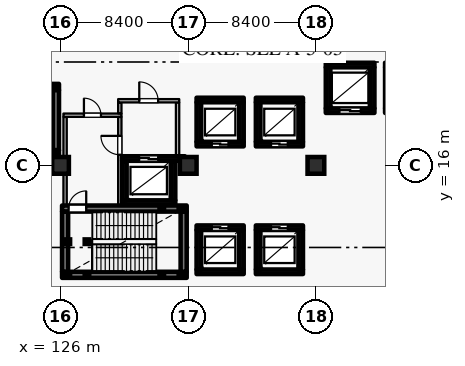
"""IFC4 building model, lengths in metres.
Left out: names, types, materials, properties, quantities, classifications, styles, units other than length and angle.
Written with IfcOpenShell. Run it as: python <this file> out.ifc"""

import sys

from ifc_helpers import new_model, si_unit, direction, frame, frame_2d, origin, origin_2d, place, context, subcontext, project, spatial, rectangle, hollow_rectangle, circle, extrude, element, fill, save


model = new_model("IFC4")
c1 = context("Model", 3, precision=1e-05, world=origin(), true_north=direction((0.0, 1.0)))
c2 = subcontext(c1, "Body", "Model", "MODEL_VIEW")
j1 = project(units=[si_unit("LENGTHUNIT", "METRE"), si_unit("PLANEANGLEUNIT", "RADIAN")], contexts=[c1])
p1 = place(None, origin())
s1 = spatial("IfcSite", under=j1, at=p1, CompositionType="ELEMENT")
p2 = place(p1, origin())
s2 = spatial("IfcBuilding", under=s1, at=p2, CompositionType="ELEMENT")
p3 = place(p2, frame((0.0, 0.0, 6.0)))
s3 = spatial("IfcBuildingStorey", under=s2, at=p3, CompositionType="ELEMENT", Elevation=6.0)
for number, where, z_axis, x_axis in (
    (1, (126.0, 16.0, 0.0), (0.0, 0.0, 1.0), (1.0, 0.0, 0.0)),
    (2, (134.4, 16.0, 0.0), (0.0, 0.0, 1.0), (1.0, 0.0, 0.0)),
    (3, (142.8, 16.0, 0.0), (0.0, 0.0, 1.0), (1.0, 0.0, 0.0)),
):
    element("IfcColumn", number, at=place(p3, frame(where, z_axis=z_axis, x_axis=x_axis)), inside=s3, PredefinedType="COLUMN", context=c2, shape_type="SweptSolid", body=[
        extrude(circle(Radius=0.55, at=origin_2d()), origin(), (0.0, 0.0, 1.0), 5.4),
    ])
p4 = place(p3, frame((134.95, 17.4, 0.0), z_axis=(0.0, 0.0, 1.0), x_axis=(1.0, 0.0, 0.0)))
e4 = element("IfcWall", 4, at=p4, inside=s3, PredefinedType="SHEAR", context=c2, shape_type="SweptSolid", body=[
    extrude(rectangle(XDim=3.1, YDim=0.3, at=frame_2d((1.55, 0.0))), origin(), (0.0, 0.0, 1.0), 5.045),
])
p5 = place(p4, frame((1.0, 0.0, 0.0)))
e5 = element("IfcOpeningElement", 5, at=p5, cuts=e4, PredefinedType="OPENING", context=c2, shape_type="SweptSolid", body=[
    extrude(rectangle(XDim=1.1, YDim=2.2, at=frame_2d((0.55, 1.1))), frame((0.0, 0.16, 0.0), z_axis=(0.0, -1.0, 0.0), x_axis=(1.0, 0.0, 0.0)), (0.0, 0.0, 1.0), 0.32),
])
p6 = place(p3, frame((137.9, 17.555, 0.0), z_axis=(0.0, 0.0, 1.0), x_axis=(0.0, 1.0, 0.0)))
e6 = element("IfcWall", 6, at=p6, inside=s3, PredefinedType="SHEAR", context=c2, shape_type="SweptSolid", body=[
    extrude(rectangle(XDim=2.59, YDim=0.3, at=frame_2d((1.295, 0.0))), origin(), (0.0, 0.0, 1.0), 5.045),
])
p7 = place(p3, frame((138.05, 20.3, 0.0), z_axis=(0.0, 0.0, 1.0), x_axis=(-1.0, 0.0, 0.0)))
e7 = element("IfcWall", 7, at=p7, inside=s3, PredefinedType="SHEAR", context=c2, shape_type="SweptSolid", body=[
    extrude(rectangle(XDim=3.1, YDim=0.3, at=frame_2d((1.55, 0.0))), origin(), (0.0, 0.0, 1.0), 5.045),
])
p8 = place(p3, frame((135.1, 20.145, 0.0), z_axis=(0.0, 0.0, 1.0), x_axis=(0.0, -1.0, 0.0)))
e8 = element("IfcWall", 8, at=p8, inside=s3, PredefinedType="SHEAR", context=c2, shape_type="SweptSolid", body=[
    extrude(rectangle(XDim=2.59, YDim=0.3, at=frame_2d((1.295, 0.0))), origin(), (0.0, 0.0, 1.0), 5.045),
])
p9 = place(p3, frame((138.85, 17.4, 0.0), z_axis=(0.0, 0.0, 1.0), x_axis=(1.0, 0.0, 0.0)))
e9 = element("IfcWall", 9, at=p9, inside=s3, PredefinedType="SHEAR", context=c2, shape_type="SweptSolid", body=[
    extrude(rectangle(XDim=3.1, YDim=0.3, at=frame_2d((1.55, 0.0))), origin(), (0.0, 0.0, 1.0), 5.045),
])
p10 = place(p9, frame((1.0, 0.0, 0.0)))
e10 = element("IfcOpeningElement", 10, at=p10, cuts=e9, PredefinedType="OPENING", context=c2, shape_type="SweptSolid", body=[
    extrude(rectangle(XDim=1.1, YDim=2.2, at=frame_2d((0.55, 1.1))), frame((0.0, 0.16, 0.0), z_axis=(0.0, -1.0, 0.0), x_axis=(1.0, 0.0, 0.0)), (0.0, 0.0, 1.0), 0.32),
])
p11 = place(p3, frame((141.8, 17.555, 0.0), z_axis=(0.0, 0.0, 1.0), x_axis=(0.0, 1.0, 0.0)))
e11 = element("IfcWall", 11, at=p11, inside=s3, PredefinedType="SHEAR", context=c2, shape_type="SweptSolid", body=[
    extrude(rectangle(XDim=2.59, YDim=0.3, at=frame_2d((1.295, 0.0))), origin(), (0.0, 0.0, 1.0), 5.045),
])
p12 = place(p3, frame((141.95, 20.3, 0.0), z_axis=(0.0, 0.0, 1.0), x_axis=(-1.0, 0.0, 0.0)))
e12 = element("IfcWall", 12, at=p12, inside=s3, PredefinedType="SHEAR", context=c2, shape_type="SweptSolid", body=[
    extrude(rectangle(XDim=3.1, YDim=0.3, at=frame_2d((1.55, 0.0))), origin(), (0.0, 0.0, 1.0), 5.045),
])
p13 = place(p3, frame((139.0, 20.145, 0.0), z_axis=(0.0, 0.0, 1.0), x_axis=(0.0, -1.0, 0.0)))
e13 = element("IfcWall", 13, at=p13, inside=s3, PredefinedType="SHEAR", context=c2, shape_type="SweptSolid", body=[
    extrude(rectangle(XDim=2.59, YDim=0.3, at=frame_2d((1.295, 0.0))), origin(), (0.0, 0.0, 1.0), 5.045),
])
p14 = place(p3, frame((134.95, 9.0, 0.0), z_axis=(0.0, 0.0, 1.0), x_axis=(1.0, 0.0, 0.0)))
e14 = element("IfcWall", 14, at=p14, inside=s3, PredefinedType="SHEAR", context=c2, shape_type="SweptSolid", body=[
    extrude(rectangle(XDim=3.1, YDim=0.3, at=frame_2d((1.55, 0.0))), origin(), (0.0, 0.0, 1.0), 5.045),
])
p15 = place(p3, frame((137.9, 9.155, 0.0), z_axis=(0.0, 0.0, 1.0), x_axis=(0.0, 1.0, 0.0)))
e15 = element("IfcWall", 15, at=p15, inside=s3, PredefinedType="SHEAR", context=c2, shape_type="SweptSolid", body=[
    extrude(rectangle(XDim=2.59, YDim=0.3, at=frame_2d((1.295, 0.0))), origin(), (0.0, 0.0, 1.0), 5.045),
])
p16 = place(p3, frame((138.05, 11.9, 0.0), z_axis=(0.0, 0.0, 1.0), x_axis=(-1.0, 0.0, 0.0)))
e16 = element("IfcWall", 16, at=p16, inside=s3, PredefinedType="SHEAR", context=c2, shape_type="SweptSolid", body=[
    extrude(rectangle(XDim=3.1, YDim=0.3, at=frame_2d((1.55, 0.0))), origin(), (0.0, 0.0, 1.0), 5.045),
])
p17 = place(p16, frame((1.0, 0.0, 0.0)))
e17 = element("IfcOpeningElement", 17, at=p17, cuts=e16, PredefinedType="OPENING", context=c2, shape_type="SweptSolid", body=[
    extrude(rectangle(XDim=1.1, YDim=2.2, at=frame_2d((0.55, 1.1))), frame((0.0, 0.16, 0.0), z_axis=(0.0, -1.0, 0.0), x_axis=(1.0, 0.0, 0.0)), (0.0, 0.0, 1.0), 0.32),
])
p18 = place(p3, frame((135.1, 11.745, 0.0), z_axis=(0.0, 0.0, 1.0), x_axis=(0.0, -1.0, 0.0)))
e18 = element("IfcWall", 18, at=p18, inside=s3, PredefinedType="SHEAR", context=c2, shape_type="SweptSolid", body=[
    extrude(rectangle(XDim=2.59, YDim=0.3, at=frame_2d((1.295, 0.0))), origin(), (0.0, 0.0, 1.0), 5.045),
])
p19 = place(p3, frame((138.85, 9.0, 0.0), z_axis=(0.0, 0.0, 1.0), x_axis=(1.0, 0.0, 0.0)))
e19 = element("IfcWall", 19, at=p19, inside=s3, PredefinedType="SHEAR", context=c2, shape_type="SweptSolid", body=[
    extrude(rectangle(XDim=3.1, YDim=0.3, at=frame_2d((1.55, 0.0))), origin(), (0.0, 0.0, 1.0), 5.045),
])
p20 = place(p3, frame((141.8, 9.155, 0.0), z_axis=(0.0, 0.0, 1.0), x_axis=(0.0, 1.0, 0.0)))
e20 = element("IfcWall", 20, at=p20, inside=s3, PredefinedType="SHEAR", context=c2, shape_type="SweptSolid", body=[
    extrude(rectangle(XDim=2.59, YDim=0.3, at=frame_2d((1.295, 0.0))), origin(), (0.0, 0.0, 1.0), 5.045),
])
p21 = place(p3, frame((141.95, 11.9, 0.0), z_axis=(0.0, 0.0, 1.0), x_axis=(-1.0, 0.0, 0.0)))
e21 = element("IfcWall", 21, at=p21, inside=s3, PredefinedType="SHEAR", context=c2, shape_type="SweptSolid", body=[
    extrude(rectangle(XDim=3.1, YDim=0.3, at=frame_2d((1.55, 0.0))), origin(), (0.0, 0.0, 1.0), 5.045),
])
p22 = place(p21, frame((1.0, 0.0, 0.0)))
e22 = element("IfcOpeningElement", 22, at=p22, cuts=e21, PredefinedType="OPENING", context=c2, shape_type="SweptSolid", body=[
    extrude(rectangle(XDim=1.1, YDim=2.2, at=frame_2d((0.55, 1.1))), frame((0.0, 0.16, 0.0), z_axis=(0.0, -1.0, 0.0), x_axis=(1.0, 0.0, 0.0)), (0.0, 0.0, 1.0), 0.32),
])
p23 = place(p3, frame((139.0, 11.745, 0.0), z_axis=(0.0, 0.0, 1.0), x_axis=(0.0, -1.0, 0.0)))
e23 = element("IfcWall", 23, at=p23, inside=s3, PredefinedType="SHEAR", context=c2, shape_type="SweptSolid", body=[
    extrude(rectangle(XDim=2.59, YDim=0.3, at=frame_2d((1.295, 0.0))), origin(), (0.0, 0.0, 1.0), 5.045),
])
p24 = place(p3, frame((130.05, 13.55, 0.0), z_axis=(0.0, 0.0, 1.0), x_axis=(1.0, 0.0, 0.0)))
e24 = element("IfcWall", 24, at=p24, inside=s3, PredefinedType="SHEAR", context=c2, shape_type="SweptSolid", body=[
    extrude(rectangle(XDim=3.5, YDim=0.3, at=frame_2d((1.75, 0.0))), origin(), (0.0, 0.0, 1.0), 5.045),
])
p25 = place(p3, frame((133.4, 13.705, 0.0), z_axis=(0.0, 0.0, 1.0), x_axis=(0.0, 1.0, 0.0)))
e25 = element("IfcWall", 25, at=p25, inside=s3, PredefinedType="SHEAR", context=c2, shape_type="SweptSolid", body=[
    extrude(rectangle(XDim=2.59, YDim=0.3, at=frame_2d((1.295, 0.0))), origin(), (0.0, 0.0, 1.0), 5.045),
])
p26 = place(p3, frame((134.18, 16.45, 0.0), z_axis=(0.0, 0.0, 1.0), x_axis=(-1.0, 0.0, 0.0)))
e26 = element("IfcWall", 26, at=p26, inside=s3, PredefinedType="SHEAR", context=c2, shape_type="SweptSolid", body=[
    extrude(rectangle(XDim=4.13, YDim=0.3, at=frame_2d((2.065, 0.0))), origin(), (0.0, 0.0, 1.0), 5.045),
])
p27 = place(p26, frame((1.755, 0.0, 0.0)))
e27 = element("IfcOpeningElement", 27, at=p27, cuts=e26, PredefinedType="OPENING", context=c2, shape_type="SweptSolid", body=[
    extrude(rectangle(XDim=1.25, YDim=2.25, at=frame_2d((0.625, 1.125))), frame((0.0, 0.16, 0.0), z_axis=(0.0, -1.0, 0.0), x_axis=(1.0, 0.0, 0.0)), (0.0, 0.0, 1.0), 0.32),
])
p28 = place(p3, frame((130.2, 16.295, 0.0), z_axis=(0.0, 0.0, 1.0), x_axis=(0.0, -1.0, 0.0)))
e28 = element("IfcWall", 28, at=p28, inside=s3, PredefinedType="SHEAR", context=c2, shape_type="SweptSolid", body=[
    extrude(rectangle(XDim=2.59, YDim=0.3, at=frame_2d((1.295, 0.0))), origin(), (0.0, 0.0, 1.0), 5.045),
])
p29 = place(p3, frame((143.45, 19.6, 0.0), z_axis=(0.0, 0.0, 1.0), x_axis=(1.0, 0.0, 0.0)))
e29 = element("IfcWall", 29, at=p29, inside=s3, PredefinedType="SHEAR", context=c2, shape_type="SweptSolid", body=[
    extrude(rectangle(XDim=3.2, YDim=0.3, at=frame_2d((1.6, 0.0))), origin(), (0.0, 0.0, 1.0), 5.045),
])
p30 = place(p29, frame((0.9, 0.0, 0.0)))
e30 = element("IfcOpeningElement", 30, at=p30, cuts=e29, PredefinedType="OPENING", context=c2, shape_type="SweptSolid", body=[
    extrude(rectangle(XDim=1.4, YDim=2.35, at=frame_2d((0.7, 1.175))), frame((0.0, 0.16, 0.0), z_axis=(0.0, -1.0, 0.0), x_axis=(1.0, 0.0, 0.0)), (0.0, 0.0, 1.0), 0.32),
])
p31 = place(p3, frame((146.5, 19.755, 0.0), z_axis=(0.0, 0.0, 1.0), x_axis=(0.0, 1.0, 0.0)))
e31 = element("IfcWall", 31, at=p31, inside=s3, PredefinedType="SHEAR", context=c2, shape_type="SweptSolid", body=[
    extrude(rectangle(XDim=2.69, YDim=0.3, at=frame_2d((1.345, 0.0))), origin(), (0.0, 0.0, 1.0), 5.045),
])
p32 = place(p3, frame((146.65, 22.6, 0.0), z_axis=(0.0, 0.0, 1.0), x_axis=(-1.0, 0.0, 0.0)))
e32 = element("IfcWall", 32, at=p32, inside=s3, PredefinedType="SHEAR", context=c2, shape_type="SweptSolid", body=[
    extrude(rectangle(XDim=3.2, YDim=0.3, at=frame_2d((1.6, 0.0))), origin(), (0.0, 0.0, 1.0), 5.045),
])
p33 = place(p3, frame((143.6, 22.445, 0.0), z_axis=(0.0, 0.0, 1.0), x_axis=(0.0, -1.0, 0.0)))
e33 = element("IfcWall", 33, at=p33, inside=s3, PredefinedType="SHEAR", context=c2, shape_type="SweptSolid", body=[
    extrude(rectangle(XDim=2.69, YDim=0.3, at=frame_2d((1.345, 0.0))), origin(), (0.0, 0.0, 1.0), 5.045),
])
p34 = place(p3, frame((126.1, 8.8, 0.0), z_axis=(0.0, 0.0, 1.0), x_axis=(1.0, 0.0, 0.0)))
e34 = element("IfcWall", 34, at=p34, inside=s3, PredefinedType="SHEAR", context=c2, shape_type="SweptSolid", body=[
    extrude(rectangle(XDim=8.2, YDim=0.4, at=frame_2d((4.1, 0.0))), origin(), (0.0, 0.0, 1.0), 5.045),
])
p35 = place(p3, frame((134.1, 9.005, 0.0), z_axis=(0.0, 0.0, 1.0), x_axis=(0.0, 1.0, 0.0)))
e35 = element("IfcWall", 35, at=p35, inside=s3, PredefinedType="SHEAR", context=c2, shape_type="SweptSolid", body=[
    extrude(rectangle(XDim=3.95, YDim=0.4, at=frame_2d((1.975, 0.0))), origin(), (0.0, 0.0, 1.0), 5.045),
])
p36 = place(p3, frame((126.1, 13.16, 0.0), z_axis=(0.0, 0.0, 1.0), x_axis=(1.0, 0.0, 0.0)))
e36 = element("IfcWall", 36, at=p36, inside=s3, PredefinedType="SHEAR", context=c2, shape_type="SweptSolid", body=[
    extrude(rectangle(XDim=8.2, YDim=0.4, at=frame_2d((4.1, 0.0))), origin(), (0.0, 0.0, 1.0), 5.045),
])
p37 = place(p36, frame((0.43, 0.0, 0.0)))
e37 = element("IfcOpeningElement", 37, at=p37, cuts=e36, PredefinedType="OPENING", context=c2, shape_type="SweptSolid", body=[
    extrude(rectangle(XDim=1.16, YDim=2.2, at=frame_2d((0.58, 1.1))), frame((0.0, 0.21, 0.0), z_axis=(0.0, -1.0, 0.0), x_axis=(1.0, 0.0, 0.0)), (0.0, 0.0, 1.0), 0.42),
])
p38 = place(p3, frame((126.3, 9.005, 0.0), z_axis=(0.0, 0.0, 1.0), x_axis=(0.0, 1.0, 0.0)))
e38 = element("IfcWall", 38, at=p38, inside=s3, PredefinedType="SHEAR", context=c2, shape_type="SweptSolid", body=[
    extrude(rectangle(XDim=3.95, YDim=0.4, at=frame_2d((1.975, 0.0))), origin(), (0.0, 0.0, 1.0), 5.045),
])
p39 = place(p3, frame((126.3, 13.365, 0.0), z_axis=(0.0, 0.0, 1.0), x_axis=(0.0, 1.0, 0.0)))
e39 = element("IfcWall", 39, at=p39, inside=s3, PredefinedType="PARTITIONING", context=c2, shape_type="SweptSolid", body=[
    extrude(rectangle(XDim=5.82, YDim=0.22, at=frame_2d((2.91, 0.0))), origin(), (0.0, 0.0, 1.0), 3.45),
])
p40 = place(p3, frame((126.19, 19.3, 0.0), z_axis=(0.0, 0.0, 1.0), x_axis=(1.0, 0.0, 0.0)))
e40 = element("IfcWall", 40, at=p40, inside=s3, PredefinedType="PARTITIONING", context=c2, shape_type="SweptSolid", body=[
    extrude(rectangle(XDim=3.82, YDim=0.22, at=frame_2d((1.91, 0.0))), origin(), (0.0, 0.0, 1.0), 5.045),
])
p41 = place(p40, frame((1.35, 0.0, 0.0)))
e41 = element("IfcOpeningElement", 41, at=p41, cuts=e40, PredefinedType="OPENING", context=c2, shape_type="SweptSolid", body=[
    extrude(rectangle(XDim=1.12, YDim=2.2, at=frame_2d((0.56, 1.1))), frame((0.0, 0.12, 0.0), z_axis=(0.0, -1.0, 0.0), x_axis=(1.0, 0.0, 0.0)), (0.0, 0.0, 1.0), 0.24),
])
p42 = place(p3, frame((129.9, 13.365, 0.0), z_axis=(0.0, 0.0, 1.0), x_axis=(0.0, 1.0, 0.0)))
e42 = element("IfcWall", 42, at=p42, inside=s3, PredefinedType="PARTITIONING", context=c2, shape_type="SweptSolid", body=[
    extrude(rectangle(XDim=5.82, YDim=0.22, at=frame_2d((2.91, 0.0))), origin(), (0.0, 0.0, 1.0), 5.045),
])
p43 = place(p42, frame((3.335, 0.0, 0.0)))
e43 = element("IfcOpeningElement", 43, at=p43, cuts=e42, PredefinedType="OPENING", context=c2, shape_type="SweptSolid", body=[
    extrude(rectangle(XDim=1.24, YDim=2.2, at=frame_2d((0.62, 1.1))), frame((0.0, 0.12, 0.0), z_axis=(0.0, -1.0, 0.0), x_axis=(1.0, 0.0, 0.0)), (0.0, 0.0, 1.0), 0.24),
])
p44 = place(p3, frame((129.9, 19.415, 0.0), z_axis=(0.0, 0.0, 1.0), x_axis=(0.0, 1.0, 0.0)))
e44 = element("IfcWall", 44, at=p44, inside=s3, PredefinedType="PARTITIONING", context=c2, shape_type="SweptSolid", body=[
    extrude(rectangle(XDim=0.72, YDim=0.22, at=frame_2d((0.36, 0.0))), origin(), (0.0, 0.0, 1.0), 5.045),
])
p45 = place(p3, frame((133.7, 16.605, 0.0), z_axis=(0.0, 0.0, 1.0), x_axis=(0.0, 1.0, 0.0)))
e45 = element("IfcWall", 45, at=p45, inside=s3, PredefinedType="PARTITIONING", context=c2, shape_type="SweptSolid", body=[
    extrude(rectangle(XDim=3.53, YDim=0.22, at=frame_2d((1.765, 0.0))), origin(), (0.0, 0.0, 1.0), 5.045),
])
p46 = place(p3, frame((129.79, 20.25, 0.0), z_axis=(0.0, 0.0, 1.0), x_axis=(1.0, 0.0, 0.0)))
e46 = element("IfcWall", 46, at=p46, inside=s3, PredefinedType="PARTITIONING", context=c2, shape_type="SweptSolid", body=[
    extrude(rectangle(XDim=4.02, YDim=0.22, at=frame_2d((2.01, 0.0))), origin(), (0.0, 0.0, 1.0), 5.045),
])
p47 = place(p46, frame((1.39, 0.0, 0.0)))
e47 = element("IfcOpeningElement", 47, at=p47, cuts=e46, PredefinedType="OPENING", context=c2, shape_type="SweptSolid", body=[
    extrude(rectangle(XDim=1.24, YDim=2.2, at=frame_2d((0.62, 1.1))), frame((0.0, 0.12, 0.0), z_axis=(0.0, -1.0, 0.0), x_axis=(1.0, 0.0, 0.0)), (0.0, 0.0, 1.0), 0.24),
])
for number, where, z_axis, x_axis in (
    (48, (126.48, 8.8, 0.0), (0.0, 0.0, 1.0), (1.0, 0.0, 0.0)),
    (49, (126.48, 10.98, 0.0), (0.0, 0.0, 1.0), (1.0, 0.0, 0.0)),
    (50, (127.74, 8.8, 0.0), (0.0, 0.0, 1.0), (1.0, 0.0, 0.0)),
    (51, (127.74, 10.98, 0.0), (0.0, 0.0, 1.0), (1.0, 0.0, 0.0)),
):
    element("IfcColumn", number, at=place(p3, frame(where, z_axis=z_axis, x_axis=x_axis)), inside=s3, PredefinedType="COLUMN", context=c2, shape_type="SweptSolid", body=[
        extrude(hollow_rectangle(XDim=0.3, YDim=0.3, WallThickness=0.012, at=origin_2d()), origin(), (0.0, 0.0, 1.0), 5.22),
    ])
for number, where, z_axis, x_axis in (
    (52, (132.66, 8.8, -3.0), (0.0, 0.0, 1.0), (1.0, 0.0, 0.0)),
    (53, (132.66, 13.16, -3.0), (0.0, 0.0, 1.0), (1.0, 0.0, 0.0)),
    (54, (133.92, 8.8, -3.0), (0.0, 0.0, 1.0), (1.0, 0.0, 0.0)),
    (55, (133.92, 13.16, -3.0), (0.0, 0.0, 1.0), (1.0, 0.0, 0.0)),
):
    element("IfcColumn", number, at=place(p3, frame(where, z_axis=z_axis, x_axis=x_axis)), inside=s3, PredefinedType="COLUMN", context=c2, shape_type="SweptSolid", body=[
        extrude(hollow_rectangle(XDim=0.3, YDim=0.3, WallThickness=0.012, at=origin_2d()), origin(), (0.0, 0.0, 1.0), 5.52),
    ])
p48 = place(p3, frame((117.7, 16.8, 0.0), z_axis=(0.0, 0.0, 1.0), x_axis=(1.0, 0.0, 0.0)))
e56 = element("IfcWall", 56, at=p48, inside=s3, PredefinedType="SHEAR", context=c2, shape_type="SweptSolid", body=[
    extrude(rectangle(XDim=8.2, YDim=0.4, at=frame_2d((4.1, 0.0))), origin(), (0.0, 0.0, 1.0), 5.045),
])
p49 = place(p3, frame((125.7, 17.005, 0.0), z_axis=(0.0, 0.0, 1.0), x_axis=(0.0, 1.0, 0.0)))
e57 = element("IfcWall", 57, at=p49, inside=s3, PredefinedType="SHEAR", context=c2, shape_type="SweptSolid", body=[
    extrude(rectangle(XDim=3.95, YDim=0.4, at=frame_2d((1.975, 0.0))), origin(), (0.0, 0.0, 1.0), 5.045),
])
p50 = place(p3, frame((117.7, 21.16, 0.0), z_axis=(0.0, 0.0, 1.0), x_axis=(1.0, 0.0, 0.0)))
e58 = element("IfcWall", 58, at=p50, inside=s3, PredefinedType="SHEAR", context=c2, shape_type="SweptSolid", body=[
    extrude(rectangle(XDim=8.2, YDim=0.4, at=frame_2d((4.1, 0.0))), origin(), (0.0, 0.0, 1.0), 5.045),
])
p51 = place(p50, frame((0.43, 0.0, 0.0)))
e59 = element("IfcOpeningElement", 59, at=p51, cuts=e58, PredefinedType="OPENING", context=c2, shape_type="SweptSolid", body=[
    extrude(rectangle(XDim=1.16, YDim=2.2, at=frame_2d((0.58, 1.1))), frame((0.0, 0.21, 0.0), z_axis=(0.0, -1.0, 0.0), x_axis=(1.0, 0.0, 0.0)), (0.0, 0.0, 1.0), 0.42),
])
for number, where, z_axis, x_axis in (
    (60, (125.52, 16.8, -3.0), (0.0, 0.0, 1.0), (1.0, 0.0, 0.0)),
    (61, (125.52, 21.16, -3.0), (0.0, 0.0, 1.0), (1.0, 0.0, 0.0)),
):
    element("IfcColumn", number, at=place(p3, frame(where, z_axis=z_axis, x_axis=x_axis)), inside=s3, PredefinedType="COLUMN", context=c2, shape_type="SweptSolid", body=[
        extrude(hollow_rectangle(XDim=0.3, YDim=0.3, WallThickness=0.012, at=origin_2d()), origin(), (0.0, 0.0, 1.0), 5.52),
    ])
p52 = place(p5, origin())
e62 = element("IfcDoor", 62, at=p52, inside=s3, OperationType="DOUBLE_DOOR_SLIDING", PredefinedType="DOOR", context=c2, shape_type="SweptSolid", body=[
    extrude(rectangle(XDim=1.1, YDim=2.2, at=frame_2d((0.55, 1.1))), frame((0.0, 0.025, 0.0), z_axis=(0.0, -1.0, 0.0), x_axis=(1.0, 0.0, 0.0)), (0.0, 0.0, 1.0), 0.05),
])
fill(e5, e62)
p53 = place(p10, origin())
e63 = element("IfcDoor", 63, at=p53, inside=s3, OperationType="DOUBLE_DOOR_SLIDING", PredefinedType="DOOR", context=c2, shape_type="SweptSolid", body=[
    extrude(rectangle(XDim=1.1, YDim=2.2, at=frame_2d((0.55, 1.1))), frame((0.0, 0.025, 0.0), z_axis=(0.0, -1.0, 0.0), x_axis=(1.0, 0.0, 0.0)), (0.0, 0.0, 1.0), 0.05),
])
fill(e10, e63)
p54 = place(p17, origin())
e64 = element("IfcDoor", 64, at=p54, inside=s3, OperationType="DOUBLE_DOOR_SLIDING", PredefinedType="DOOR", context=c2, shape_type="SweptSolid", body=[
    extrude(rectangle(XDim=1.1, YDim=2.2, at=frame_2d((0.55, 1.1))), frame((0.0, 0.025, 0.0), z_axis=(0.0, -1.0, 0.0), x_axis=(1.0, 0.0, 0.0)), (0.0, 0.0, 1.0), 0.05),
])
fill(e17, e64)
p55 = place(p22, origin())
e65 = element("IfcDoor", 65, at=p55, inside=s3, OperationType="DOUBLE_DOOR_SLIDING", PredefinedType="DOOR", context=c2, shape_type="SweptSolid", body=[
    extrude(rectangle(XDim=1.1, YDim=2.2, at=frame_2d((0.55, 1.1))), frame((0.0, 0.025, 0.0), z_axis=(0.0, -1.0, 0.0), x_axis=(1.0, 0.0, 0.0)), (0.0, 0.0, 1.0), 0.05),
])
fill(e22, e65)
p56 = place(p27, origin())
e66 = element("IfcDoor", 66, at=p56, inside=s3, OperationType="DOUBLE_DOOR_SLIDING", PredefinedType="DOOR", context=c2, shape_type="SweptSolid", body=[
    extrude(rectangle(XDim=1.25, YDim=2.25, at=frame_2d((0.625, 1.125))), frame((0.0, 0.025, 0.0), z_axis=(0.0, -1.0, 0.0), x_axis=(1.0, 0.0, 0.0)), (0.0, 0.0, 1.0), 0.05),
])
fill(e27, e66)
p57 = place(p30, origin())
e67 = element("IfcDoor", 67, at=p57, inside=s3, OperationType="DOUBLE_DOOR_SLIDING", PredefinedType="DOOR", context=c2, shape_type="SweptSolid", body=[
    extrude(rectangle(XDim=1.4, YDim=2.35, at=frame_2d((0.7, 1.175))), frame((0.0, 0.025, 0.0), z_axis=(0.0, -1.0, 0.0), x_axis=(1.0, 0.0, 0.0)), (0.0, 0.0, 1.0), 0.05),
])
fill(e30, e67)
p58 = place(p37, origin())
e68 = element("IfcDoor", 68, at=p58, inside=s3, OperationType="SINGLE_SWING_RIGHT", PredefinedType="DOOR", context=c2, shape_type="SweptSolid", body=[
    extrude(rectangle(XDim=1.16, YDim=2.2, at=frame_2d((0.58, 1.1))), frame((0.0, 0.025, 0.0), z_axis=(0.0, -1.0, 0.0), x_axis=(1.0, 0.0, 0.0)), (0.0, 0.0, 1.0), 0.05),
])
fill(e37, e68)
p59 = place(p41, origin())
e69 = element("IfcDoor", 69, at=p59, inside=s3, OperationType="SINGLE_SWING_LEFT", PredefinedType="DOOR", context=c2, shape_type="SweptSolid", body=[
    extrude(rectangle(XDim=1.12, YDim=2.2, at=frame_2d((0.56, 1.1))), frame((0.0, 0.025, 0.0), z_axis=(0.0, -1.0, 0.0), x_axis=(1.0, 0.0, 0.0)), (0.0, 0.0, 1.0), 0.05),
])
fill(e41, e69)
p60 = place(p43, origin())
e70 = element("IfcDoor", 70, at=p60, inside=s3, OperationType="SINGLE_SWING_RIGHT", PredefinedType="DOOR", context=c2, shape_type="SweptSolid", body=[
    extrude(rectangle(XDim=1.24, YDim=2.2, at=frame_2d((0.62, 1.1))), frame((0.0, 0.025, 0.0), z_axis=(0.0, -1.0, 0.0), x_axis=(1.0, 0.0, 0.0)), (0.0, 0.0, 1.0), 0.05),
])
fill(e43, e70)
p61 = place(p47, origin())
e71 = element("IfcDoor", 71, at=p61, inside=s3, OperationType="SINGLE_SWING_LEFT", PredefinedType="DOOR", context=c2, shape_type="SweptSolid", body=[
    extrude(rectangle(XDim=1.24, YDim=2.2, at=frame_2d((0.62, 1.1))), frame((0.0, 0.025, 0.0), z_axis=(0.0, -1.0, 0.0), x_axis=(1.0, 0.0, 0.0)), (0.0, 0.0, 1.0), 0.05),
])
fill(e47, e71)
save(model, sys.argv[1])
